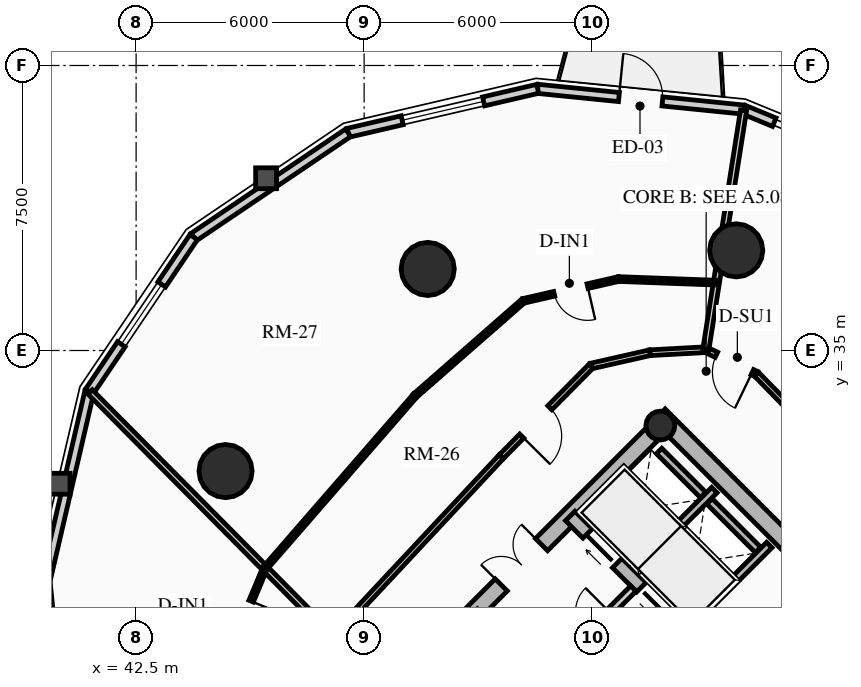
"""IFC4 building model, lengths in metres.
Left out: names, types, materials, properties, quantities, classifications, styles, units other than length and angle.
Written with IfcOpenShell. Run it as: python <this file> out.ifc"""

import sys

from ifc_helpers import new_model, si_unit, direction, frame, frame_2d, origin, origin_2d, place, context, subcontext, project, spatial, rectangle, circle, hollow_circle, extrude, source, transform, mapped, element, fill, save


model = new_model("IFC4")
c1 = context("Model", 3, precision=1e-05, world=origin(), true_north=direction((0.0, 1.0)))
c2 = subcontext(c1, "Body", "Model", "MODEL_VIEW")
j1 = project(units=[si_unit("LENGTHUNIT", "METRE"), si_unit("PLANEANGLEUNIT", "RADIAN")], contexts=[c1])
p1 = place(None, origin())
s1 = spatial("IfcSite", under=j1, at=p1, CompositionType="ELEMENT")
p2 = place(p1, origin())
s2 = spatial("IfcBuilding", under=s1, at=p2, CompositionType="ELEMENT")
p3 = place(p2, frame((0.0, 0.0, 87.61)))
s3 = spatial("IfcBuildingStorey", under=s2, at=p3, CompositionType="ELEMENT", Elevation=87.61)
p4 = place(p3, frame((66.303, 23.263, 0.0), z_axis=(0.0, 0.0, 1.0), x_axis=(-0.707106781187, 0.707106781187, 0.0)))
e1 = element("IfcWall", 1, at=p4, inside=s3, PredefinedType="SHEAR", context=c2, shape_type="SweptSolid", body=[
    extrude(rectangle(XDim=14.2, YDim=0.45, at=frame_2d((7.1, 0.0))), origin(), (0.0, 0.0, 1.0), 2.91),
])
p5 = place(p3, frame((48.856, 25.578, 0.0), z_axis=(0.0, 0.0, 1.0), x_axis=(0.707106781187, 0.707106781187, 0.0)))
e2 = element("IfcWall", 2, at=p5, inside=s3, PredefinedType="SHEAR", context=c2, shape_type="SweptSolid", body=[
    extrude(rectangle(XDim=10.7, YDim=0.45, at=frame_2d((5.35, 0.0))), origin(), (0.0, 0.0, 1.0), 2.91),
])
m1 = source(origin(), c2, "Body", "SweptSolid", [
    extrude(rectangle(XDim=1.5, YDim=2.02, at=frame_2d((0.75, 1.01))), frame((0.0, 0.235, 0.0), z_axis=(0.0, -1.0, 0.0), x_axis=(1.0, 0.0, 0.0)), (0.0, 0.0, 1.0), 0.47),
])
p6 = place(p5, frame((4.6, 0.0, 0.0)))
e3 = element("IfcOpeningElement", 3, at=p6, cuts=e2, PredefinedType="OPENING", context=c2, shape_type="MappedRepresentation", body=[
    mapped(m1, transform((0.0, 0.0, 0.0), x_axis=(1.0, 0.0, 0.0), y_axis=(0.0, 1.0, 0.0), z_axis=(0.0, 0.0, 1.0), scale=1.0)),
])
p7 = place(p3, frame((63.645, 20.922, 0.0), z_axis=(0.0, 0.0, 1.0), x_axis=(-0.707106781187, 0.707106781187, 0.0)))
e4 = element("IfcWall", 4, at=p7, inside=s3, PredefinedType="SHEAR", context=c2, shape_type="SweptSolid", body=[
    extrude(rectangle(XDim=13.75, YDim=0.35, at=frame_2d((6.875, 0.0))), origin(), (0.0, 0.0, 1.0), 2.91),
])
m2 = source(origin(), c2, "Body", "SweptSolid", [
    extrude(rectangle(XDim=1.1, YDim=2.015, at=frame_2d((0.55, 1.007))), frame((0.0, 0.185, 0.0), z_axis=(0.0, -1.0, 0.0), x_axis=(1.0, 0.0, 0.0)), (0.0, 0.0, 1.0), 0.37),
])
p8 = place(p7, frame((10.0, 0.0, 0.0)))
e5 = element("IfcOpeningElement", 5, at=p8, cuts=e4, PredefinedType="OPENING", context=c2, shape_type="MappedRepresentation", body=[
    mapped(m2, transform((0.0, 0.0, 0.0), x_axis=(1.0, 0.0, 0.0), y_axis=(0.0, 1.0, 0.0), z_axis=(0.0, 0.0, 1.0), scale=1.0)),
])
p9 = place(p7, frame((12.0, 0.0, 0.0)))
e6 = element("IfcOpeningElement", 6, at=p9, cuts=e4, PredefinedType="OPENING", context=c2, shape_type="MappedRepresentation", body=[
    mapped(m2, transform((0.0, 0.0, 0.0), x_axis=(1.0, 0.0, 0.0), y_axis=(0.0, 1.0, 0.0), z_axis=(0.0, 0.0, 1.0), scale=1.0)),
])
m3 = source(origin(), c2, "Body", "SweptSolid", [
    extrude(rectangle(XDim=1.15, YDim=2.02, at=frame_2d((0.575, 1.01))), frame((0.0, 0.185, 0.0), z_axis=(0.0, -1.0, 0.0), x_axis=(1.0, 0.0, 0.0)), (0.0, 0.0, 1.0), 0.37),
])
p10 = place(p7, frame((5.305, 0.0, 0.0)))
e7 = element("IfcOpeningElement", 7, at=p10, cuts=e4, PredefinedType="OPENING", context=c2, shape_type="MappedRepresentation", body=[
    mapped(m3, transform((0.0, 0.0, 0.0), x_axis=(1.0, 0.0, 0.0), y_axis=(0.0, 1.0, 0.0), z_axis=(0.0, 0.0, 1.0), scale=1.0)),
])
p11 = place(p3, frame((56.294, 33.024, 0.0), z_axis=(0.0, 0.0, 1.0), x_axis=(0.707106781187, 0.707106781187, 0.0)))
e8 = element("IfcColumn", 8, at=p11, inside=s3, PredefinedType="COLUMN", context=c2, shape_type="SweptSolid", body=[
    extrude(hollow_circle(Radius=0.38, WallThickness=0.032, at=origin_2d()), origin(), (0.0, 0.0, 1.0), 2.91),
])
for number, where, z_axis, x_axis in (
    (9, (58.291, 37.635, 0.0), (0.0, 0.0, 1.0), (1.0, 0.0, 0.0)),
    (10, (50.173, 37.146, 0.0), (0.0, 0.0, 1.0), (1.0, 0.0, 0.0)),
    (11, (44.854, 31.827, 0.0), (0.0, 0.0, 1.0), (1.0, 0.0, 0.0)),
):
    element("IfcColumn", number, at=place(p3, frame(where, z_axis=z_axis, x_axis=x_axis)), inside=s3, PredefinedType="USERDEFINED", context=c2, shape_type="SweptSolid", body=[
        extrude(circle(Radius=0.7, at=origin_2d()), origin(), (0.0, 0.0, 1.0), 2.91),
    ])
p12 = place(p3, frame((58.487, 41.339, 0.0), z_axis=(0.0, 0.0, 1.0), x_axis=(0.924556017656, -0.381046152345, 0.0)))
e12 = element("IfcWall", 12, at=p12, inside=s3, PredefinedType="SOLIDWALL", context=c2, shape_type="SweptSolid", body=[
    extrude(rectangle(XDim=0.87, YDim=0.24, at=frame_2d((0.435, 0.0))), origin(), (0.0, 0.0, 1.0), 2.179),
])
p13 = place(p3, frame((53.067, 41.885, 0.0), z_axis=(0.0, 0.0, 1.0), x_axis=(0.994971754311, -0.10015591906, 0.0)))
e13 = element("IfcWall", 13, at=p13, inside=s3, PredefinedType="SOLIDWALL", context=c2, shape_type="SweptSolid", body=[
    extrude(rectangle(XDim=5.448, YDim=0.24, at=frame_2d((2.724, 0.0))), origin(), (0.0, 0.0, 1.0), 2.179),
])
m4 = source(origin(), c2, "Body", "SweptSolid", [
    extrude(rectangle(XDim=1.15, YDim=2.005, at=frame_2d((0.575, 1.002))), frame((0.0, 0.13, 0.0), z_axis=(0.0, -1.0, 0.0), x_axis=(1.0, 0.0, 0.0)), (0.0, 0.0, 1.0), 0.26),
])
p14 = place(p13, frame((2.149, 0.0, 0.0)))
e14 = element("IfcOpeningElement", 14, at=p14, cuts=e13, PredefinedType="OPENING", context=c2, shape_type="MappedRepresentation", body=[
    mapped(m4, transform((0.0, 0.0, 0.0), x_axis=(1.0, 0.0, 0.0), y_axis=(0.0, 1.0, 0.0), z_axis=(0.0, 0.0, 1.0), scale=1.0)),
])
p15 = place(p3, frame((48.08, 40.729, 0.0), z_axis=(0.0, 0.0, 1.0), x_axis=(0.974165631126, 0.225834725257, 0.0)))
e15 = element("IfcWall", 15, at=p15, inside=s3, PredefinedType="SOLIDWALL", context=c2, shape_type="SweptSolid", body=[
    extrude(rectangle(XDim=5.119, YDim=0.24, at=frame_2d((2.56, 0.0))), origin(), (0.0, 0.0, 1.0), 2.179),
])
m5 = source(origin(), c2, "Body", "SweptSolid", [
    extrude(rectangle(XDim=2.2, YDim=1.35, at=frame_2d((1.1, 0.675))), frame((0.0, 0.13, 0.0), z_axis=(0.0, -1.0, 0.0), x_axis=(1.0, 0.0, 0.0)), (0.0, 0.0, 1.0), 0.26),
])
p16 = place(p15, frame((1.459, 0.0, 0.65)))
e16 = element("IfcOpeningElement", 16, at=p16, cuts=e15, PredefinedType="OPENING", context=c2, shape_type="MappedRepresentation", body=[
    mapped(m5, transform((0.0, 0.0, 0.0), x_axis=(1.0, 0.0, 0.0), y_axis=(0.0, 1.0, 0.0), z_axis=(0.0, 0.0, 1.0), scale=1.0)),
])
p17 = place(p3, frame((44.015, 37.985, 0.0), z_axis=(0.0, 0.0, 1.0), x_axis=(0.828781148131, 0.559572880421, 0.0)))
e17 = element("IfcWall", 17, at=p17, inside=s3, PredefinedType="SOLIDWALL", context=c2, shape_type="SweptSolid", body=[
    extrude(rectangle(XDim=4.905, YDim=0.24, at=frame_2d((2.452, 0.0))), origin(), (0.0, 0.0, 1.0), 2.179),
])
p18 = place(p3, frame((41.271, 33.92, 0.0), z_axis=(0.0, 0.0, 1.0), x_axis=(0.559572880421, 0.828781148131, 0.0)))
e18 = element("IfcWall", 18, at=p18, inside=s3, PredefinedType="SOLIDWALL", context=c2, shape_type="SweptSolid", body=[
    extrude(rectangle(XDim=4.905, YDim=0.24, at=frame_2d((2.452, 0.0))), origin(), (0.0, 0.0, 1.0), 2.179),
])
m6 = source(origin(), c2, "Body", "SweptSolid", [
    extrude(rectangle(XDim=1.9, YDim=1.35, at=frame_2d((0.95, 0.675))), frame((0.0, 0.13, 0.0), z_axis=(0.0, -1.0, 0.0), x_axis=(1.0, 0.0, 0.0)), (0.0, 0.0, 1.0), 0.26),
])
p19 = place(p18, frame((1.502, 0.0, 0.65)))
e19 = element("IfcOpeningElement", 19, at=p19, cuts=e18, PredefinedType="OPENING", context=c2, shape_type="MappedRepresentation", body=[
    mapped(m6, transform((0.0, 0.0, 0.0), x_axis=(1.0, 0.0, 0.0), y_axis=(0.0, 1.0, 0.0), z_axis=(0.0, 0.0, 1.0), scale=1.0)),
])
p20 = place(p3, frame((40.115, 28.933, 0.0), z_axis=(0.0, 0.0, 1.0), x_axis=(0.225834725257, 0.974165631126, 0.0)))
e20 = element("IfcWall", 20, at=p20, inside=s3, PredefinedType="SOLIDWALL", context=c2, shape_type="SweptSolid", body=[
    extrude(rectangle(XDim=5.119, YDim=0.24, at=frame_2d((2.56, 0.0))), origin(), (0.0, 0.0, 1.0), 2.179),
])
p21 = place(p3, frame((40.661, 23.513, 0.0), z_axis=(0.0, 0.0, 1.0), x_axis=(-0.10015591906, 0.994971754311, 0.0)))
e21 = element("IfcWall", 21, at=p21, inside=s3, PredefinedType="SOLIDWALL", context=c2, shape_type="SweptSolid", body=[
    extrude(rectangle(XDim=5.448, YDim=0.24, at=frame_2d((2.724, 0.0))), origin(), (0.0, 0.0, 1.0), 2.179),
])
p22 = place(p21, frame((1.774, 0.0, 0.65)))
e22 = element("IfcOpeningElement", 22, at=p22, cuts=e21, PredefinedType="OPENING", context=c2, shape_type="MappedRepresentation", body=[
    mapped(m6, transform((0.0, 0.0, 0.0), x_axis=(1.0, 0.0, 0.0), y_axis=(0.0, 1.0, 0.0), z_axis=(0.0, 0.0, 1.0), scale=1.0)),
])
p23 = place(p3, frame((57.062, 27.781, 0.0), z_axis=(0.0, 0.0, 1.0), x_axis=(0.707106781187, 0.707106781187, 0.0)))
e23 = element("IfcWall", 23, at=p23, inside=s3, PredefinedType="SHEAR", context=c2, shape_type="SweptSolid", body=[
    extrude(rectangle(XDim=2.97, YDim=0.2, at=frame_2d((1.485, 0.0))), origin(), (0.0, 0.0, 1.0), 2.91),
])
p24 = place(p3, frame((55.615, 29.227, 0.0), z_axis=(0.0, 0.0, 1.0), x_axis=(0.707147878904, 0.70706568108, 0.0)))
e24 = element("IfcWall", 24, at=p24, inside=s3, PredefinedType="SHEAR", context=c2, shape_type="SweptSolid", body=[
    extrude(rectangle(XDim=2.97, YDim=0.2, at=frame_2d((1.485, 0.0))), origin(), (0.0, 0.0, 1.0), 2.91),
])
p25 = place(p3, frame((58.865, 29.754, 0.0), z_axis=(0.0, 0.0, 1.0), x_axis=(-0.707174411312, 0.707039144592, 0.0)))
e25 = element("IfcWall", 25, at=p25, inside=s3, PredefinedType="SHEAR", context=c2, shape_type="SweptSolid", body=[
    extrude(rectangle(XDim=1.805, YDim=0.2, at=frame_2d((0.902, 0.0))), origin(), (0.0, 0.0, 1.0), 2.91),
])
p26 = place(p3, frame((57.419, 31.2, 0.0), z_axis=(0.0, 0.0, 1.0), x_axis=(-0.707032117043, 0.707181437447, 0.0)))
e26 = element("IfcWall", 26, at=p26, inside=s3, PredefinedType="SHEAR", context=c2, shape_type="SweptSolid", body=[
    extrude(rectangle(XDim=1.635, YDim=0.2, at=frame_2d((0.817, 0.0))), origin(), (0.0, 0.0, 1.0), 2.91),
])
p27 = place(p3, frame((53.264, 26.416, 0.0), z_axis=(0.0, 0.0, 1.0), x_axis=(0.707106781187, 0.707106781187, 0.0)))
e27 = element("IfcWall", 27, at=p27, inside=s3, PredefinedType="PARTITIONING", context=c2, shape_type="SweptSolid", body=[
    extrude(rectangle(XDim=3.28, YDim=0.2, at=frame_2d((1.64, 0.0))), origin(), (0.0, 0.0, 1.0), 2.655),
])
m7 = source(origin(), c2, "Body", "SweptSolid", [
    extrude(rectangle(XDim=1.0, YDim=2.015, at=frame_2d((0.5, 1.007))), frame((0.0, 0.11, 0.0), z_axis=(0.0, -1.0, 0.0), x_axis=(1.0, 0.0, 0.0)), (0.0, 0.0, 1.0), 0.22),
])
p28 = place(p27, frame((0.14, 0.0, 0.0)))
e28 = element("IfcOpeningElement", 28, at=p28, cuts=e27, PredefinedType="OPENING", context=c2, shape_type="MappedRepresentation", body=[
    mapped(m7, transform((0.0, 0.0, 0.0), x_axis=(1.0, 0.0, 0.0), y_axis=(0.0, 1.0, 0.0), z_axis=(0.0, 0.0, 1.0), scale=1.0)),
])
m8 = source(origin(), c2, "Body", "SweptSolid", [
    extrude(rectangle(XDim=0.9, YDim=2.005, at=frame_2d((0.45, 1.002))), frame((0.0, 0.11, 0.0), z_axis=(0.0, -1.0, 0.0), x_axis=(1.0, 0.0, 0.0)), (0.0, 0.0, 1.0), 0.22),
])
p29 = place(p27, frame((1.5, 0.0, 0.0)))
e29 = element("IfcOpeningElement", 29, at=p29, cuts=e27, PredefinedType="OPENING", context=c2, shape_type="MappedRepresentation", body=[
    mapped(m8, transform((0.0, 0.0, 0.0), x_axis=(1.0, 0.0, 0.0), y_axis=(0.0, 1.0, 0.0), z_axis=(0.0, 0.0, 1.0), scale=1.0)),
])
p30 = place(p3, frame((63.051, 30.051, 0.0), z_axis=(0.0, 0.0, 1.0), x_axis=(-0.698846622234, 0.715271555839, 0.0)))
e30 = element("IfcWall", 30, at=p30, inside=s3, PredefinedType="PARTITIONING", context=c2, shape_type="SweptSolid", body=[
    extrude(rectangle(XDim=6.05, YDim=0.15, at=frame_2d((3.025, 0.0))), origin(), (0.0, 0.0, 1.0), 2.225),
])
p31 = place(p3, frame((58.823, 34.378, 0.0), z_axis=(0.0, 0.0, 1.0), x_axis=(-0.900449137666, 0.434961320668, 0.0)))
e31 = element("IfcWall", 31, at=p31, inside=s3, PredefinedType="PARTITIONING", context=c2, shape_type="SweptSolid", body=[
    extrude(rectangle(XDim=1.479, YDim=0.15, at=frame_2d((0.74, 0.0))), origin(), (0.0, 0.0, 1.0), 2.225),
])
m9 = source(origin(), c2, "Body", "SweptSolid", [
    extrude(rectangle(XDim=1.05, YDim=2.015, at=frame_2d((0.525, 1.007))), frame((0.0, 0.085, 0.0), z_axis=(0.0, -1.0, 0.0), x_axis=(1.0, 0.0, 0.0)), (0.0, 0.0, 1.0), 0.17),
])
p32 = place(p31, frame((0.12, 0.0, 0.0)))
e32 = element("IfcOpeningElement", 32, at=p32, cuts=e31, PredefinedType="OPENING", context=c2, shape_type="MappedRepresentation", body=[
    mapped(m9, transform((0.0, 0.0, 0.0), x_axis=(1.0, 0.0, 0.0), y_axis=(0.0, 1.0, 0.0), z_axis=(0.0, 0.0, 1.0), scale=1.0)),
])
p33 = place(p3, frame((57.491, 35.021, 0.0), z_axis=(0.0, 0.0, 1.0), x_axis=(-0.9985194771, -0.054395347698, 0.0)))
e33 = element("IfcWall", 33, at=p33, inside=s3, PredefinedType="PARTITIONING", context=c2, shape_type="SweptSolid", body=[
    extrude(rectangle(XDim=1.472, YDim=0.15, at=frame_2d((0.736, 0.0))), origin(), (0.0, 0.0, 1.0), 2.225),
])
p34 = place(p3, frame((56.021, 34.941, 0.0), z_axis=(0.0, 0.0, 1.0), x_axis=(-0.975309543901, -0.220842236847, 0.0)))
e34 = element("IfcWall", 34, at=p34, inside=s3, PredefinedType="PARTITIONING", context=c2, shape_type="SweptSolid", body=[
    extrude(rectangle(XDim=1.585, YDim=0.15, at=frame_2d((0.792, 0.0))), origin(), (0.0, 0.0, 1.0), 2.225),
])
p35 = place(p3, frame((54.475, 34.591, 0.0), z_axis=(0.0, 0.0, 1.0), x_axis=(-0.703869646439, -0.710329163714, 0.0)))
e35 = element("IfcWall", 35, at=p35, inside=s3, PredefinedType="PARTITIONING", context=c2, shape_type="SweptSolid", body=[
    extrude(rectangle(XDim=3.364, YDim=0.15, at=frame_2d((1.682, 0.0))), origin(), (0.0, 0.0, 1.0), 2.225),
])
p36 = place(p35, frame((1.546, 0.0, 0.0)))
e36 = element("IfcOpeningElement", 36, at=p36, cuts=e35, PredefinedType="OPENING", context=c2, shape_type="MappedRepresentation", body=[
    mapped(m9, transform((0.0, 0.0, 0.0), x_axis=(1.0, 0.0, 0.0), y_axis=(0.0, 1.0, 0.0), z_axis=(0.0, 0.0, 1.0), scale=1.0)),
])
p37 = place(p3, frame((52.107, 32.202, 0.0), z_axis=(0.0, 0.0, 1.0), x_axis=(-0.682605209028, -0.730787334734, 0.0)))
e37 = element("IfcWall", 37, at=p37, inside=s3, PredefinedType="PARTITIONING", context=c2, shape_type="SweptSolid", body=[
    extrude(rectangle(XDim=6.486, YDim=0.15, at=frame_2d((3.243, 0.0))), origin(), (0.0, 0.0, 1.0), 2.225),
])
p38 = place(p3, frame((57.491, 35.021, 0.0), z_axis=(0.0, 0.0, 1.0), x_axis=(0.155805268746, 0.98778779008, 0.0)))
e38 = element("IfcWall", 38, at=p38, inside=s3, PredefinedType="PARTITIONING", context=c2, shape_type="SweptSolid", body=[
    extrude(rectangle(XDim=6.376, YDim=0.16, at=frame_2d((3.188, 0.0))), origin(), (0.0, 0.0, 1.0), 2.179),
])
p39 = place(p3, frame((47.68, 27.462, 0.0), z_axis=(0.0, 0.0, 1.0), x_axis=(-0.703913074907, 0.710286127539, 0.0)))
e39 = element("IfcWall", 39, at=p39, inside=s3, PredefinedType="PARTITIONING", context=c2, shape_type="SweptSolid", body=[
    extrude(rectangle(XDim=9.079, YDim=0.16, at=frame_2d((4.54, 0.0))), origin(), (0.0, 0.0, 1.0), 2.179),
])
p40 = place(p3, frame((57.769, 36.785, 0.0), z_axis=(0.0, 0.0, 1.0), x_axis=(-0.999316779648, 0.036959084311, 0.0)))
e40 = element("IfcWall", 40, at=p40, inside=s3, PredefinedType="PARTITIONING", context=c2, shape_type="SweptSolid", body=[
    extrude(rectangle(XDim=2.576, YDim=0.125, at=frame_2d((1.288, 0.0))), origin(), (0.0, 0.0, 1.0), 2.655),
])
p41 = place(p3, frame((55.194, 36.88, 0.0), z_axis=(0.0, 0.0, 1.0), x_axis=(-0.97469098149, -0.22355645954, 0.0)))
e41 = element("IfcWall", 41, at=p41, inside=s3, PredefinedType="PARTITIONING", context=c2, shape_type="SweptSolid", body=[
    extrude(rectangle(XDim=2.573, YDim=0.125, at=frame_2d((1.287, 0.0))), origin(), (0.0, 0.0, 1.0), 2.225),
])
m10 = source(origin(), c2, "Body", "SweptSolid", [
    extrude(rectangle(XDim=0.9, YDim=2.005, at=frame_2d((0.45, 1.002))), frame((0.0, 0.073, 0.0), z_axis=(0.0, -1.0, 0.0), x_axis=(1.0, 0.0, 0.0)), (0.0, 0.0, 1.0), 0.145),
])
p42 = place(p41, frame((0.836, 0.0, 0.0)))
e42 = element("IfcOpeningElement", 42, at=p42, cuts=e41, PredefinedType="OPENING", context=c2, shape_type="MappedRepresentation", body=[
    mapped(m10, transform((0.0, 0.0, 0.0), x_axis=(1.0, 0.0, 0.0), y_axis=(0.0, 1.0, 0.0), z_axis=(0.0, 0.0, 1.0), scale=1.0)),
])
p43 = place(p3, frame((52.687, 36.305, 0.0), z_axis=(0.0, 0.0, 1.0), x_axis=(-0.752332345919, -0.658783759123, 0.0)))
e43 = element("IfcWall", 43, at=p43, inside=s3, PredefinedType="PARTITIONING", context=c2, shape_type="SweptSolid", body=[
    extrude(rectangle(XDim=3.776, YDim=0.125, at=frame_2d((1.888, 0.0))), origin(), (0.0, 0.0, 1.0), 2.225),
])
p44 = place(p3, frame((49.845, 33.817, 0.0), z_axis=(0.0, 0.0, 1.0), x_axis=(-0.656101508867, -0.754672650931, 0.0)))
e44 = element("IfcWall", 44, at=p44, inside=s3, PredefinedType="PARTITIONING", context=c2, shape_type="SweptSolid", body=[
    extrude(rectangle(XDim=6.029, YDim=0.125, at=frame_2d((3.014, 0.0))), origin(), (0.0, 0.0, 1.0), 2.225),
])
p45 = place(p3, frame((45.89, 29.268, 0.0), z_axis=(0.0, 0.0, 1.0), x_axis=(-0.387057419757, -0.922055613188, 0.0)))
e45 = element("IfcWall", 45, at=p45, inside=s3, PredefinedType="PARTITIONING", context=c2, shape_type="SweptSolid", body=[
    extrude(rectangle(XDim=2.774, YDim=0.125, at=frame_2d((1.387, 0.0))), origin(), (0.0, 0.0, 1.0), 2.225),
])
p46 = place(p45, frame((0.937, 0.0, 0.0)))
e46 = element("IfcOpeningElement", 46, at=p46, cuts=e45, PredefinedType="OPENING", context=c2, shape_type="MappedRepresentation", body=[
    mapped(m10, transform((0.0, 0.0, 0.0), x_axis=(1.0, 0.0, 0.0), y_axis=(0.0, 1.0, 0.0), z_axis=(0.0, 0.0, 1.0), scale=1.0)),
])
m11 = source(origin(), c2, "Body", "SweptSolid", [
    extrude(rectangle(XDim=1.15, YDim=2.005, at=frame_2d((0.575, 1.002))), frame((0.0, 0.025, 0.0), z_axis=(0.0, -1.0, 0.0), x_axis=(1.0, 0.0, 0.0)), (0.0, 0.0, 1.0), 0.05),
])
p47 = place(p14, origin())
e47 = element("IfcDoor", 47, at=p47, inside=s3, OperationType="SINGLE_SWING_LEFT", PredefinedType="DOOR", context=c2, shape_type="MappedRepresentation", body=[
    mapped(m11, transform((0.0, 0.0, 0.0), x_axis=(1.0, 0.0, 0.0), y_axis=(0.0, 1.0, 0.0), z_axis=(0.0, 0.0, 1.0), scale=1.0)),
])
fill(e14, e47)
m12 = source(origin(), c2, "Body", "SweptSolid", [
    extrude(rectangle(XDim=2.2, YDim=1.35, at=frame_2d((1.1, 0.675))), frame((0.0, 0.03, 0.0), z_axis=(0.0, -1.0, 0.0), x_axis=(1.0, 0.0, 0.0)), (0.0, 0.0, 1.0), 0.06),
])
p48 = place(p16, origin())
e48 = element("IfcWindow", 48, at=p48, inside=s3, PartitioningType="DOUBLE_PANEL_VERTICAL", PredefinedType="WINDOW", context=c2, shape_type="MappedRepresentation", body=[
    mapped(m12, transform((0.0, 0.0, 0.0), x_axis=(1.0, 0.0, 0.0), y_axis=(0.0, 1.0, 0.0), z_axis=(0.0, 0.0, 1.0), scale=1.0)),
])
fill(e16, e48)
m13 = source(origin(), c2, "Body", "SweptSolid", [
    extrude(rectangle(XDim=1.9, YDim=1.35, at=frame_2d((0.95, 0.675))), frame((0.0, 0.03, 0.0), z_axis=(0.0, -1.0, 0.0), x_axis=(1.0, 0.0, 0.0)), (0.0, 0.0, 1.0), 0.06),
])
p49 = place(p19, origin())
e49 = element("IfcWindow", 49, at=p49, inside=s3, PartitioningType="DOUBLE_PANEL_VERTICAL", PredefinedType="WINDOW", context=c2, shape_type="MappedRepresentation", body=[
    mapped(m13, transform((0.0, 0.0, 0.0), x_axis=(1.0, 0.0, 0.0), y_axis=(0.0, 1.0, 0.0), z_axis=(0.0, 0.0, 1.0), scale=1.0)),
])
fill(e19, e49)
m14 = source(origin(), c2, "Body", "SweptSolid", [
    extrude(rectangle(XDim=1.1, YDim=2.015, at=frame_2d((0.55, 1.007))), frame((0.0, 0.025, 0.0), z_axis=(0.0, -1.0, 0.0), x_axis=(1.0, 0.0, 0.0)), (0.0, 0.0, 1.0), 0.05),
])
p50 = place(p8, origin())
e50 = element("IfcDoor", 50, at=p50, inside=s3, OperationType="SLIDING_TO_LEFT", PredefinedType="DOOR", context=c2, shape_type="MappedRepresentation", body=[
    mapped(m14, transform((0.0, 0.0, 0.0), x_axis=(1.0, 0.0, 0.0), y_axis=(0.0, 1.0, 0.0), z_axis=(0.0, 0.0, 1.0), scale=1.0)),
])
fill(e5, e50)
p51 = place(p9, origin())
e51 = element("IfcDoor", 51, at=p51, inside=s3, OperationType="SLIDING_TO_RIGHT", PredefinedType="DOOR", context=c2, shape_type="MappedRepresentation", body=[
    mapped(m14, transform((0.0, 0.0, 0.0), x_axis=(1.0, 0.0, 0.0), y_axis=(0.0, 1.0, 0.0), z_axis=(0.0, 0.0, 1.0), scale=1.0)),
])
fill(e6, e51)
m15 = source(origin(), c2, "Body", "SweptSolid", [
    extrude(rectangle(XDim=1.5, YDim=2.02, at=frame_2d((0.75, 1.01))), frame((0.0, 0.025, 0.0), z_axis=(0.0, -1.0, 0.0), x_axis=(1.0, 0.0, 0.0)), (0.0, 0.0, 1.0), 0.05),
])
p52 = place(p6, origin())
e52 = element("IfcDoor", 52, at=p52, inside=s3, OperationType="DOUBLE_DOOR_SINGLE_SWING", PredefinedType="DOOR", context=c2, shape_type="MappedRepresentation", body=[
    mapped(m15, transform((0.0, 0.0, 0.0), x_axis=(1.0, 0.0, 0.0), y_axis=(0.0, 1.0, 0.0), z_axis=(0.0, 0.0, 1.0), scale=1.0)),
])
fill(e3, e52)
m16 = source(origin(), c2, "Body", "SweptSolid", [
    extrude(rectangle(XDim=1.05, YDim=2.015, at=frame_2d((0.525, 1.007))), frame((0.0, 0.025, 0.0), z_axis=(0.0, -1.0, 0.0), x_axis=(1.0, 0.0, 0.0)), (0.0, 0.0, 1.0), 0.05),
])
p53 = place(p36, origin())
e53 = element("IfcDoor", 53, at=p53, inside=s3, OperationType="SINGLE_SWING_RIGHT", PredefinedType="DOOR", context=c2, shape_type="MappedRepresentation", body=[
    mapped(m16, transform((0.0, 0.0, 0.0), x_axis=(1.0, 0.0, 0.0), y_axis=(0.0, 1.0, 0.0), z_axis=(0.0, 0.0, 1.0), scale=1.0)),
])
fill(e36, e53)
m17 = source(origin(), c2, "Body", "SweptSolid", [
    extrude(rectangle(XDim=0.9, YDim=2.005, at=frame_2d((0.45, 1.002))), frame((0.0, 0.025, 0.0), z_axis=(0.0, -1.0, 0.0), x_axis=(1.0, 0.0, 0.0)), (0.0, 0.0, 1.0), 0.05),
])
p54 = place(p42, origin())
e54 = element("IfcDoor", 54, at=p54, inside=s3, OperationType="SINGLE_SWING_LEFT", PredefinedType="DOOR", context=c2, shape_type="MappedRepresentation", body=[
    mapped(m17, transform((0.0, 0.0, 0.0), x_axis=(1.0, 0.0, 0.0), y_axis=(0.0, 1.0, 0.0), z_axis=(0.0, 0.0, 1.0), scale=1.0)),
])
fill(e42, e54)
p55 = place(p46, origin())
e55 = element("IfcDoor", 55, at=p55, inside=s3, OperationType="SINGLE_SWING_LEFT", PredefinedType="DOOR", context=c2, shape_type="MappedRepresentation", body=[
    mapped(m17, transform((0.0, 0.0, 0.0), x_axis=(1.0, 0.0, 0.0), y_axis=(0.0, 1.0, 0.0), z_axis=(0.0, 0.0, 1.0), scale=1.0)),
])
fill(e46, e55)
p56 = place(p32, origin())
e56 = element("IfcDoor", 56, at=p56, inside=s3, OperationType="SINGLE_SWING_LEFT", PredefinedType="DOOR", context=c2, shape_type="MappedRepresentation", body=[
    mapped(m16, transform((0.0, 0.0, 0.0), x_axis=(1.0, 0.0, 0.0), y_axis=(0.0, 1.0, 0.0), z_axis=(0.0, 0.0, 1.0), scale=1.0)),
])
fill(e32, e56)
save(model, sys.argv[1])
